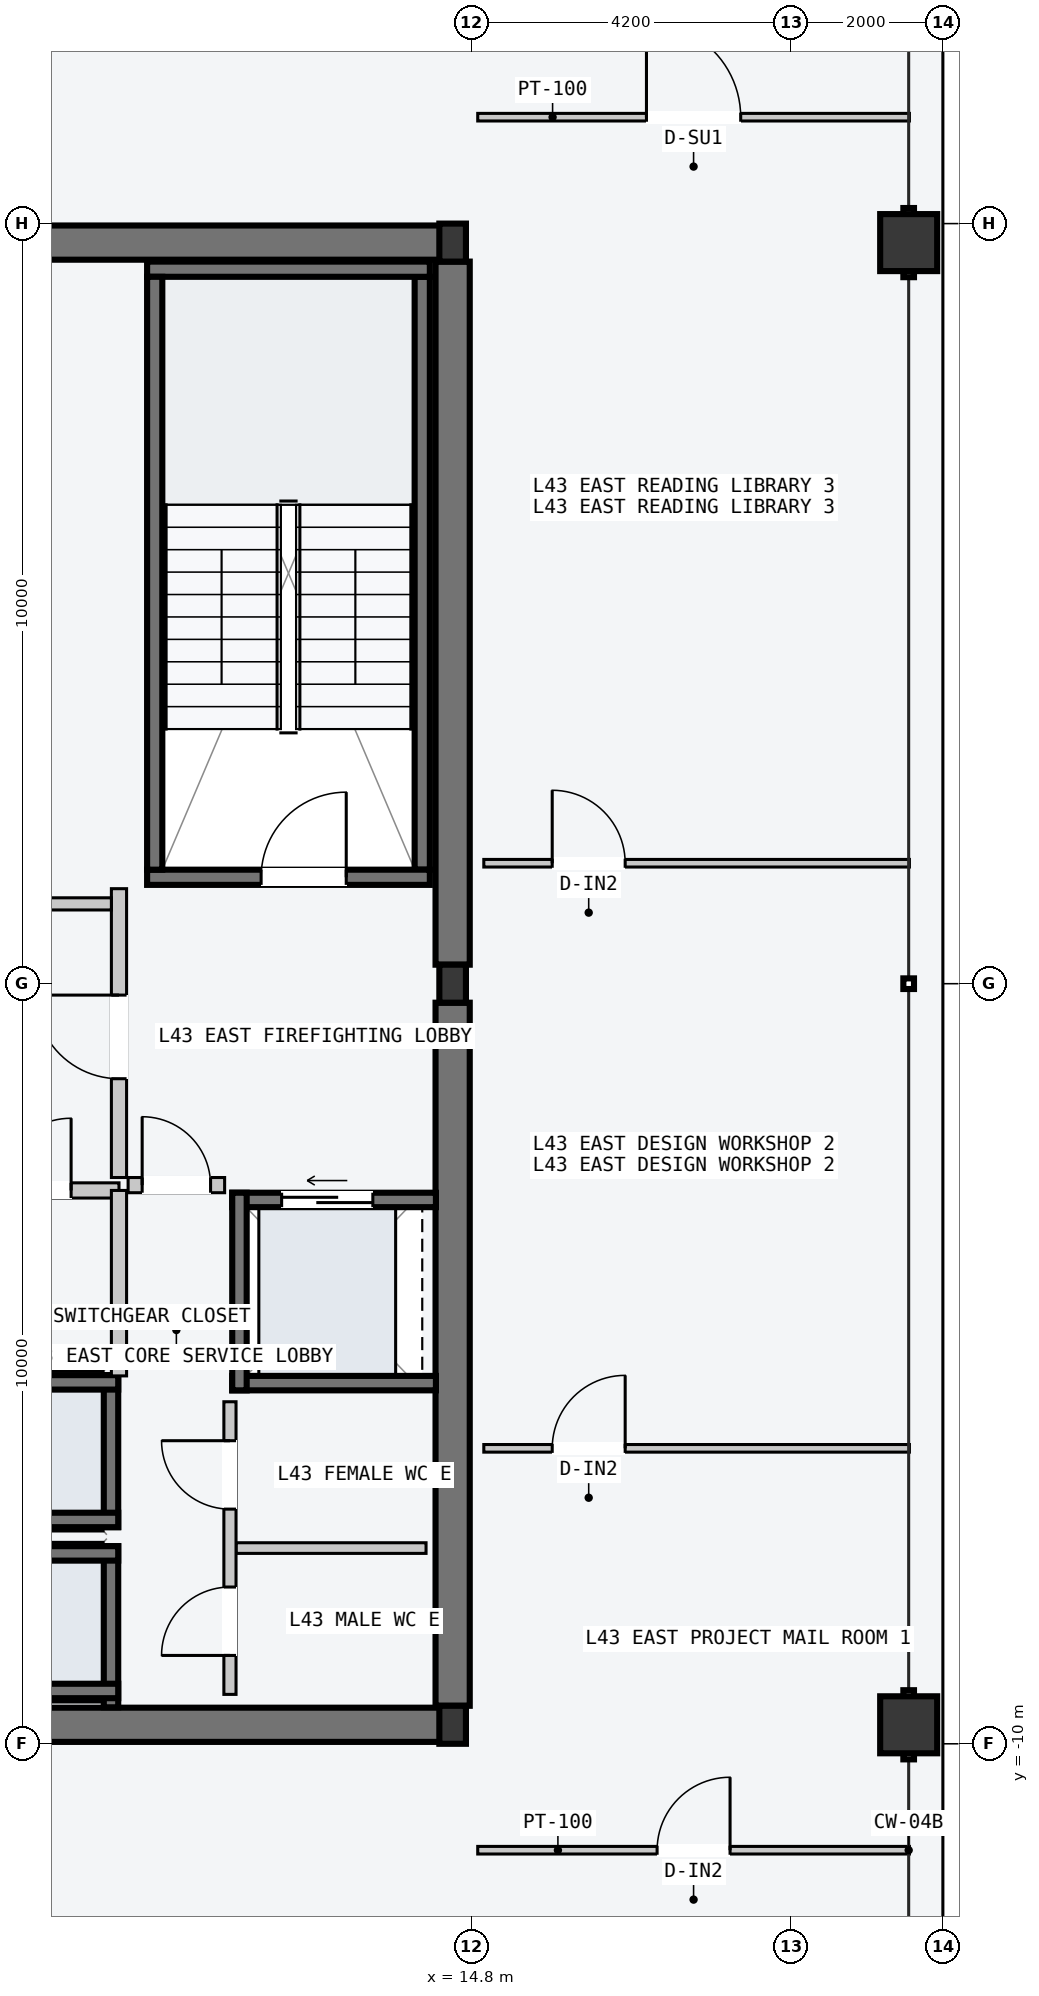
"""IFC4 building model, lengths in metres.
Left out: names, types, materials, properties, quantities, classifications, styles, units other than length and angle.
Written with IfcOpenShell. Run it as: python <this file> out.ifc"""

import sys

from ifc_helpers import new_model, si_unit, direction, frame, frame_2d, origin, origin_2d, place, context, subcontext, project, spatial, rectangle, hollow_rectangle, i_section, extrude, element, fill, save


model = new_model("IFC4")
c1 = context("Model", 3, precision=1e-05, world=origin(), true_north=direction((0.0, 1.0)))
c2 = subcontext(c1, "Body", "Model", "MODEL_VIEW")
j1 = project(units=[si_unit("LENGTHUNIT", "METRE"), si_unit("PLANEANGLEUNIT", "RADIAN")], contexts=[c1])
p1 = place(None, origin())
s1 = spatial("IfcSite", under=j1, at=p1, CompositionType="ELEMENT")
p2 = place(p1, origin())
s2 = spatial("IfcBuilding", under=s1, at=p2, CompositionType="ELEMENT")
p3 = place(p2, frame((0.0, 0.0, 165.9)))
s3 = spatial("IfcBuildingStorey", under=s2, at=p3, CompositionType="ELEMENT", Elevation=165.9)
for number, where, z_axis, x_axis in (
    (1, (8.07, -9.75, -0.2), (0.0, 0.0, 1.0), (1.0, 0.0, 0.0)),
    (2, (8.07, 9.75, -0.2), (0.0, 0.0, 1.0), (1.0, 0.0, 0.0)),
):
    element("IfcWall", number, at=place(p3, frame(where, z_axis=z_axis, x_axis=x_axis)), inside=s3, PredefinedType="SHEAR", context=c2, shape_type="SweptSolid", body=[
        extrude(rectangle(XDim=6.46, YDim=0.45, at=frame_2d((3.23, 0.0))), origin(), (0.0, 0.0, 1.0), 3.6),
    ])
for number, where, z_axis, x_axis in (
    (3, (14.55, -9.5, -0.2), (0.0, 0.0, 1.0), (0.0, 1.0, 0.0)),
    (4, (14.55, 0.25, -0.2), (0.0, 0.0, 1.0), (0.0, 1.0, 0.0)),
):
    element("IfcWall", number, at=place(p3, frame(where, z_axis=z_axis, x_axis=x_axis)), inside=s3, PredefinedType="SHEAR", context=c2, shape_type="SweptSolid", body=[
        extrude(rectangle(XDim=9.25, YDim=0.45, at=frame_2d((4.625, 0.0))), origin(), (0.0, 0.0, 1.0), 3.6),
    ])
p4 = place(p3, frame((14.15, 1.5, -0.2), z_axis=(0.0, 0.0, 1.0), x_axis=(0.0, 1.0, 0.0)))
e5 = element("IfcWall", 5, at=p4, inside=s3, PredefinedType="SOLIDWALL", context=c2, shape_type="SweptSolid", body=[
    extrude(rectangle(XDim=7.8, YDim=0.2, at=frame_2d((3.9, 0.0))), origin(), (0.0, 0.0, 1.0), 3.6),
])
p5 = place(p3, frame((10.53, 1.4, -0.2), z_axis=(0.0, 0.0, 1.0), x_axis=(1.0, 0.0, 0.0)))
e6 = element("IfcWall", 6, at=p5, inside=s3, PredefinedType="SOLIDWALL", context=c2, shape_type="SweptSolid", body=[
    extrude(rectangle(XDim=3.72, YDim=0.2, at=frame_2d((1.86, 0.0))), origin(), (0.0, 0.0, 1.0), 3.6),
])
p6 = place(p5, frame((1.5, 0.0, 0.2)))
e7 = element("IfcOpeningElement", 7, at=p6, cuts=e6, PredefinedType="OPENING", context=c2, shape_type="SweptSolid", body=[
    extrude(rectangle(XDim=1.12, YDim=2.18, at=frame_2d((0.56, 1.09))), frame((0.0, 0.11, 0.0), z_axis=(0.0, -1.0, 0.0), x_axis=(1.0, 0.0, 0.0)), (0.0, 0.0, 1.0), 0.22),
])
p7 = place(p3, frame((10.53, 9.4, -0.2), z_axis=(0.0, 0.0, 1.0), x_axis=(1.0, 0.0, 0.0)))
e8 = element("IfcWall", 8, at=p7, inside=s3, PredefinedType="SOLIDWALL", context=c2, shape_type="SweptSolid", body=[
    extrude(rectangle(XDim=3.72, YDim=0.2, at=frame_2d((1.86, 0.0))), origin(), (0.0, 0.0, 1.0), 3.6),
])
p8 = place(p3, frame((10.63, 1.5, -0.2), z_axis=(0.0, 0.0, 1.0), x_axis=(0.0, 1.0, 0.0)))
e9 = element("IfcWall", 9, at=p8, inside=s3, PredefinedType="SOLIDWALL", context=c2, shape_type="SweptSolid", body=[
    extrude(rectangle(XDim=7.8, YDim=0.2, at=frame_2d((3.9, 0.0))), origin(), (0.0, 0.0, 1.0), 3.6),
])
for number, where, z_axis, x_axis in (
    (10, (14.55, -9.75, 0.0), (0.0, 0.0, 1.0), (1.0, 0.0, 0.0)),
    (11, (14.55, 0.0, 0.0), (0.0, 0.0, 1.0), (1.0, 0.0, 0.0)),
    (12, (14.55, 9.75, 0.0), (0.0, 0.0, 1.0), (1.0, 0.0, 0.0)),
):
    element("IfcColumn", number, at=place(p3, frame(where, z_axis=z_axis, x_axis=x_axis)), inside=s3, PredefinedType="COLUMN", context=c2, shape_type="SweptSolid", body=[
        extrude(i_section(OverallWidth=0.35, OverallDepth=0.5, WebThickness=0.02, FlangeThickness=0.032, at=origin_2d()), origin(), (0.0, 0.0, 1.0), 3.6),
    ])
for number, where, z_axis, x_axis in (
    (13, (20.55, -9.75, 0.0), (0.0, 0.0, 1.0), (0.0, 1.0, 0.0)),
    (14, (20.55, 9.75, 0.0), (0.0, 0.0, 1.0), (0.0, 1.0, 0.0)),
):
    element("IfcColumn", number, at=place(p3, frame(where, z_axis=z_axis, x_axis=x_axis)), inside=s3, PredefinedType="COLUMN", context=c2, shape_type="SweptSolid", body=[
        extrude(hollow_rectangle(XDim=0.75, YDim=0.75, WallThickness=0.032, at=origin_2d()), origin(), (0.0, 0.0, 1.0), 3.6),
    ])
p9 = place(p3, frame((10.055, -9.52, -0.2), z_axis=(0.0, 0.0, 1.0), x_axis=(0.0, 1.0, 0.0)))
e15 = element("IfcWall", 15, at=p9, inside=s3, PredefinedType="SOLIDWALL", context=c2, shape_type="SweptSolid", body=[
    extrude(rectangle(XDim=2.12, YDim=0.19, at=frame_2d((1.06, 0.0))), origin(), (0.0, 0.0, 1.0), 3.6),
])
for number, where, z_axis, x_axis in (
    (16, (7.95, -7.495, -0.2), (0.0, 0.0, 1.0), (1.0, 0.0, 0.0)),
    (17, (7.95, -9.305, -0.2), (0.0, 0.0, 1.0), (1.0, 0.0, 0.0)),
):
    element("IfcWall", number, at=place(p3, frame(where, z_axis=z_axis, x_axis=x_axis)), inside=s3, PredefinedType="SOLIDWALL", context=c2, shape_type="SweptSolid", body=[
        extrude(rectangle(XDim=2.2, YDim=0.19, at=frame_2d((1.1, 0.0))), origin(), (0.0, 0.0, 1.0), 3.6),
    ])
p10 = place(p3, frame((10.055, -7.15, -0.2), z_axis=(0.0, 0.0, 1.0), x_axis=(0.0, 1.0, 0.0)))
e18 = element("IfcWall", 18, at=p10, inside=s3, PredefinedType="SOLIDWALL", context=c2, shape_type="SweptSolid", body=[
    extrude(rectangle(XDim=2.0, YDim=0.19, at=frame_2d((1.0, 0.0))), origin(), (0.0, 0.0, 1.0), 3.6),
])
for number, where, z_axis, x_axis in (
    (19, (7.95, -5.245, -0.2), (0.0, 0.0, 1.0), (1.0, 0.0, 0.0)),
    (20, (7.95, -7.055, -0.2), (0.0, 0.0, 1.0), (1.0, 0.0, 0.0)),
):
    element("IfcWall", number, at=place(p3, frame(where, z_axis=z_axis, x_axis=x_axis)), inside=s3, PredefinedType="SOLIDWALL", context=c2, shape_type="SweptSolid", body=[
        extrude(rectangle(XDim=2.2, YDim=0.19, at=frame_2d((1.1, 0.0))), origin(), (0.0, 0.0, 1.0), 3.6),
    ])
p11 = place(p3, frame((11.65, -2.845, -0.2), z_axis=(0.0, 0.0, 1.0), x_axis=(1.0, 0.0, 0.0)))
e21 = element("IfcWall", 21, at=p11, inside=s3, PredefinedType="SOLIDWALL", context=c2, shape_type="SweptSolid", body=[
    extrude(rectangle(XDim=2.68, YDim=0.19, at=frame_2d((1.34, 0.0))), origin(), (0.0, 0.0, 1.0), 3.6),
])
p12 = place(p11, frame((0.65, 0.0, 0.2)))
e22 = element("IfcOpeningElement", 22, at=p12, cuts=e21, PredefinedType="OPENING", context=c2, shape_type="SweptSolid", body=[
    extrude(rectangle(XDim=1.2, YDim=2.2, at=frame_2d((0.6, 1.1))), frame((0.0, 0.105, 0.0), z_axis=(0.0, -1.0, 0.0), x_axis=(1.0, 0.0, 0.0)), (0.0, 0.0, 1.0), 0.21),
])
p13 = place(p3, frame((11.65, -5.255, -0.2), z_axis=(0.0, 0.0, 1.0), x_axis=(1.0, 0.0, 0.0)))
e23 = element("IfcWall", 23, at=p13, inside=s3, PredefinedType="SOLIDWALL", context=c2, shape_type="SweptSolid", body=[
    extrude(rectangle(XDim=2.68, YDim=0.19, at=frame_2d((1.34, 0.0))), origin(), (0.0, 0.0, 1.0), 3.6),
])
p14 = place(p3, frame((11.745, -5.35, -0.2), z_axis=(0.0, 0.0, 1.0), x_axis=(0.0, 1.0, 0.0)))
e24 = element("IfcWall", 24, at=p14, inside=s3, PredefinedType="SOLIDWALL", context=c2, shape_type="SweptSolid", body=[
    extrude(rectangle(XDim=2.6, YDim=0.19, at=frame_2d((1.3, 0.0))), origin(), (0.0, 0.0, 1.0), 3.6),
])
p15 = place(p3, frame((10.16, -2.55, 0.0), z_axis=(0.0, 0.0, 1.0), x_axis=(0.0, 1.0, 0.0)))
e25 = element("IfcWall", 25, at=p15, inside=s3, PredefinedType="PARTITIONING", context=c2, shape_type="SweptSolid", body=[
    extrude(rectangle(XDim=3.8, YDim=0.2, at=frame_2d((1.9, 0.0))), origin(), (0.0, 0.0, 1.0), 3.4),
])
p16 = place(p15, frame((1.3, 0.0, 0.0)))
e26 = element("IfcOpeningElement", 26, at=p16, cuts=e25, PredefinedType="OPENING", context=c2, shape_type="SweptSolid", body=[
    extrude(rectangle(XDim=1.1, YDim=2.15, at=frame_2d((0.55, 1.075))), frame((0.0, 0.11, 0.0), z_axis=(0.0, -1.0, 0.0), x_axis=(1.0, 0.0, 0.0)), (0.0, 0.0, 1.0), 0.22),
])
p17 = place(p3, frame((10.28, -2.65, 0.0), z_axis=(0.0, 0.0, 1.0), x_axis=(1.0, 0.0, 0.0)))
e27 = element("IfcWall", 27, at=p17, inside=s3, PredefinedType="PARTITIONING", context=c2, shape_type="SweptSolid", body=[
    extrude(rectangle(XDim=1.27, YDim=0.2, at=frame_2d((0.635, 0.0))), origin(), (0.0, 0.0, 1.0), 3.4),
])
p18 = place(p17, frame((0.185, 0.0, 0.0)))
e28 = element("IfcOpeningElement", 28, at=p18, cuts=e27, PredefinedType="OPENING", context=c2, shape_type="SweptSolid", body=[
    extrude(rectangle(XDim=0.9, YDim=2.15, at=frame_2d((0.45, 1.075))), frame((0.0, 0.11, 0.0), z_axis=(0.0, -1.0, 0.0), x_axis=(1.0, 0.0, 0.0)), (0.0, 0.0, 1.0), 0.22),
])
p19 = place(p3, frame((7.96, -2.72, 0.0), z_axis=(0.0, 0.0, 1.0), x_axis=(1.0, 0.0, 0.0)))
e29 = element("IfcWall", 29, at=p19, inside=s3, PredefinedType="PARTITIONING", context=c2, shape_type="SweptSolid", body=[
    extrude(rectangle(XDim=2.2, YDim=0.2, at=frame_2d((1.1, 0.0))), origin(), (0.0, 0.0, 1.0), 3.4),
])
p20 = place(p19, frame((0.62, 0.0, 0.0)))
e30 = element("IfcOpeningElement", 30, at=p20, cuts=e29, PredefinedType="OPENING", context=c2, shape_type="SweptSolid", body=[
    extrude(rectangle(XDim=0.95, YDim=2.1, at=frame_2d((0.475, 1.05))), frame((0.0, 0.11, 0.0), z_axis=(0.0, -1.0, 0.0), x_axis=(1.0, 0.0, 0.0)), (0.0, 0.0, 1.0), 0.22),
])
p21 = place(p3, frame((10.16, -5.16, 0.0), z_axis=(0.0, 0.0, 1.0), x_axis=(0.0, 1.0, 0.0)))
e31 = element("IfcWall", 31, at=p21, inside=s3, PredefinedType="PARTITIONING", context=c2, shape_type="SweptSolid", body=[
    extrude(rectangle(XDim=2.44, YDim=0.2, at=frame_2d((1.22, 0.0))), origin(), (0.0, 0.0, 1.0), 3.4),
])
p22 = place(p3, frame((11.7, -7.425, 0.0), z_axis=(0.0, 0.0, 1.0), x_axis=(1.0, 0.0, 0.0)))
e32 = element("IfcWall", 32, at=p22, inside=s3, PredefinedType="PARTITIONING", context=c2, shape_type="SweptSolid", body=[
    extrude(rectangle(XDim=2.5, YDim=0.14, at=frame_2d((1.25, 0.0))), origin(), (0.0, 0.0, 1.0), 3.4),
])
p23 = place(p3, frame((11.62, -9.35, 0.0), z_axis=(0.0, 0.0, 1.0), x_axis=(0.0, 1.0, 0.0)))
e33 = element("IfcWall", 33, at=p23, inside=s3, PredefinedType="PARTITIONING", context=c2, shape_type="SweptSolid", body=[
    extrude(rectangle(XDim=3.85, YDim=0.16, at=frame_2d((1.925, 0.0))), origin(), (0.0, 0.0, 1.0), 3.4),
])
p24 = place(p23, frame((0.512, 0.0, 0.0)))
e34 = element("IfcOpeningElement", 34, at=p24, cuts=e33, PredefinedType="OPENING", context=c2, shape_type="SweptSolid", body=[
    extrude(rectangle(XDim=0.9, YDim=2.15, at=frame_2d((0.45, 1.075))), frame((0.0, 0.09, 0.0), z_axis=(0.0, -1.0, 0.0), x_axis=(1.0, 0.0, 0.0)), (0.0, 0.0, 1.0), 0.18),
])
p25 = place(p23, frame((2.438, 0.0, 0.0)))
e35 = element("IfcOpeningElement", 35, at=p25, cuts=e33, PredefinedType="OPENING", context=c2, shape_type="SweptSolid", body=[
    extrude(rectangle(XDim=0.9, YDim=2.15, at=frame_2d((0.45, 1.075))), frame((0.0, 0.09, 0.0), z_axis=(0.0, -1.0, 0.0), x_axis=(1.0, 0.0, 0.0)), (0.0, 0.0, 1.0), 0.18),
])
p26 = place(p3, frame((1.26, 1.05, 0.0), z_axis=(0.0, 0.0, 1.0), x_axis=(1.0, 0.0, 0.0)))
e36 = element("IfcWall", 36, at=p26, inside=s3, PredefinedType="PARTITIONING", context=c2, shape_type="SweptSolid", body=[
    extrude(rectangle(XDim=8.8, YDim=0.16, at=frame_2d((4.4, 0.0))), origin(), (0.0, 0.0, 1.0), 3.4),
])
p27 = place(p3, frame((14.88, 11.4, 0.0), z_axis=(0.0, 0.0, 1.0), x_axis=(1.0, 0.0, 0.0)))
e37 = element("IfcWall", 37, at=p27, inside=s3, PredefinedType="PARTITIONING", context=c2, shape_type="SweptSolid", body=[
    extrude(rectangle(XDim=5.68, YDim=0.1, at=frame_2d((2.84, 0.0))), origin(), (0.0, 0.0, 1.0), 3.4),
])
p28 = place(p27, frame((2.22, 0.0, 0.0)))
e38 = element("IfcOpeningElement", 38, at=p28, cuts=e37, PredefinedType="OPENING", context=c2, shape_type="SweptSolid", body=[
    extrude(rectangle(XDim=1.24, YDim=2.24, at=frame_2d((0.62, 1.12))), frame((0.0, 0.06, 0.0), z_axis=(0.0, -1.0, 0.0), x_axis=(1.0, 0.0, 0.0)), (0.0, 0.0, 1.0), 0.12),
])
p29 = place(p3, frame((14.88, -11.4, 0.0), z_axis=(0.0, 0.0, 1.0), x_axis=(1.0, 0.0, 0.0)))
e39 = element("IfcWall", 39, at=p29, inside=s3, PredefinedType="PARTITIONING", context=c2, shape_type="SweptSolid", body=[
    extrude(rectangle(XDim=5.68, YDim=0.1, at=frame_2d((2.84, 0.0))), origin(), (0.0, 0.0, 1.0), 3.4),
])
p30 = place(p29, frame((2.36, 0.0, 0.0)))
e40 = element("IfcOpeningElement", 40, at=p30, cuts=e39, PredefinedType="OPENING", context=c2, shape_type="SweptSolid", body=[
    extrude(rectangle(XDim=0.96, YDim=2.18, at=frame_2d((0.48, 1.09))), frame((0.0, 0.06, 0.0), z_axis=(0.0, -1.0, 0.0), x_axis=(1.0, 0.0, 0.0)), (0.0, 0.0, 1.0), 0.12),
])
p31 = place(p3, frame((14.96, -6.113, 0.0), z_axis=(0.0, 0.0, 1.0), x_axis=(1.0, 0.0, 0.0)))
e41 = element("IfcWall", 41, at=p31, inside=s3, PredefinedType="PARTITIONING", context=c2, shape_type="SweptSolid", body=[
    extrude(rectangle(XDim=5.6, YDim=0.1, at=frame_2d((2.8, 0.0))), origin(), (0.0, 0.0, 1.0), 3.4),
])
p32 = place(p31, frame((0.9, 0.0, 0.0)))
e42 = element("IfcOpeningElement", 42, at=p32, cuts=e41, PredefinedType="OPENING", context=c2, shape_type="SweptSolid", body=[
    extrude(rectangle(XDim=0.96, YDim=2.18, at=frame_2d((0.48, 1.09))), frame((0.0, 0.06, 0.0), z_axis=(0.0, -1.0, 0.0), x_axis=(1.0, 0.0, 0.0)), (0.0, 0.0, 1.0), 0.12),
])
p33 = place(p3, frame((14.96, 1.585, 0.0), z_axis=(0.0, 0.0, 1.0), x_axis=(1.0, 0.0, 0.0)))
e43 = element("IfcWall", 43, at=p33, inside=s3, PredefinedType="PARTITIONING", context=c2, shape_type="SweptSolid", body=[
    extrude(rectangle(XDim=5.6, YDim=0.1, at=frame_2d((2.8, 0.0))), origin(), (0.0, 0.0, 1.0), 3.4),
])
p34 = place(p33, frame((0.9, 0.0, 0.0)))
e44 = element("IfcOpeningElement", 44, at=p34, cuts=e43, PredefinedType="OPENING", context=c2, shape_type="SweptSolid", body=[
    extrude(rectangle(XDim=0.96, YDim=2.18, at=frame_2d((0.48, 1.09))), frame((0.0, 0.06, 0.0), z_axis=(0.0, -1.0, 0.0), x_axis=(1.0, 0.0, 0.0)), (0.0, 0.0, 1.0), 0.12),
])
p35 = place(p6, origin())
e45 = element("IfcDoor", 45, at=p35, inside=s3, OperationType="SINGLE_SWING_RIGHT", PredefinedType="DOOR", context=c2, shape_type="SweptSolid", body=[
    extrude(rectangle(XDim=1.12, YDim=2.18, at=frame_2d((0.56, 1.09))), frame((0.0, 0.025, 0.0), z_axis=(0.0, -1.0, 0.0), x_axis=(1.0, 0.0, 0.0)), (0.0, 0.0, 1.0), 0.05),
])
fill(e7, e45)
p36 = place(p12, origin())
e46 = element("IfcDoor", 46, at=p36, inside=s3, OperationType="SLIDING_TO_LEFT", PredefinedType="DOOR", context=c2, shape_type="SweptSolid", body=[
    extrude(rectangle(XDim=1.2, YDim=2.2, at=frame_2d((0.6, 1.1))), frame((0.0, 0.025, 0.0), z_axis=(0.0, -1.0, 0.0), x_axis=(1.0, 0.0, 0.0)), (0.0, 0.0, 1.0), 0.05),
])
fill(e22, e46)
p37 = place(p16, origin())
e47 = element("IfcDoor", 47, at=p37, inside=s3, OperationType="SINGLE_SWING_RIGHT", PredefinedType="DOOR", context=c2, shape_type="SweptSolid", body=[
    extrude(rectangle(XDim=1.1, YDim=2.15, at=frame_2d((0.55, 1.075))), frame((0.0, 0.025, 0.0), z_axis=(0.0, -1.0, 0.0), x_axis=(1.0, 0.0, 0.0)), (0.0, 0.0, 1.0), 0.05),
])
fill(e26, e47)
p38 = place(p18, origin())
e48 = element("IfcDoor", 48, at=p38, inside=s3, OperationType="SINGLE_SWING_LEFT", PredefinedType="DOOR", context=c2, shape_type="SweptSolid", body=[
    extrude(rectangle(XDim=0.9, YDim=2.15, at=frame_2d((0.45, 1.075))), frame((0.0, 0.025, 0.0), z_axis=(0.0, -1.0, 0.0), x_axis=(1.0, 0.0, 0.0)), (0.0, 0.0, 1.0), 0.05),
])
fill(e28, e48)
p39 = place(p20, origin())
e49 = element("IfcDoor", 49, at=p39, inside=s3, OperationType="SINGLE_SWING_RIGHT", PredefinedType="DOOR", context=c2, shape_type="SweptSolid", body=[
    extrude(rectangle(XDim=0.95, YDim=2.1, at=frame_2d((0.475, 1.05))), frame((0.0, 0.025, 0.0), z_axis=(0.0, -1.0, 0.0), x_axis=(1.0, 0.0, 0.0)), (0.0, 0.0, 1.0), 0.05),
])
fill(e30, e49)
p40 = place(p24, origin())
e50 = element("IfcDoor", 50, at=p40, inside=s3, OperationType="SINGLE_SWING_LEFT", PredefinedType="DOOR", context=c2, shape_type="SweptSolid", body=[
    extrude(rectangle(XDim=0.9, YDim=2.15, at=frame_2d((0.45, 1.075))), frame((0.0, 0.025, 0.0), z_axis=(0.0, -1.0, 0.0), x_axis=(1.0, 0.0, 0.0)), (0.0, 0.0, 1.0), 0.05),
])
fill(e34, e50)
p41 = place(p25, origin())
e51 = element("IfcDoor", 51, at=p41, inside=s3, OperationType="SINGLE_SWING_RIGHT", PredefinedType="DOOR", context=c2, shape_type="SweptSolid", body=[
    extrude(rectangle(XDim=0.9, YDim=2.15, at=frame_2d((0.45, 1.075))), frame((0.0, 0.025, 0.0), z_axis=(0.0, -1.0, 0.0), x_axis=(1.0, 0.0, 0.0)), (0.0, 0.0, 1.0), 0.05),
])
fill(e35, e51)
p42 = place(p28, origin())
e52 = element("IfcDoor", 52, at=p42, inside=s3, OperationType="SINGLE_SWING_LEFT", PredefinedType="DOOR", context=c2, shape_type="SweptSolid", body=[
    extrude(rectangle(XDim=1.24, YDim=2.24, at=frame_2d((0.62, 1.12))), frame((0.0, 0.025, 0.0), z_axis=(0.0, -1.0, 0.0), x_axis=(1.0, 0.0, 0.0)), (0.0, 0.0, 1.0), 0.05),
])
fill(e38, e52)
p43 = place(p30, origin())
e53 = element("IfcDoor", 53, at=p43, inside=s3, OperationType="SINGLE_SWING_RIGHT", PredefinedType="DOOR", context=c2, shape_type="SweptSolid", body=[
    extrude(rectangle(XDim=0.96, YDim=2.18, at=frame_2d((0.48, 1.09))), frame((0.0, 0.025, 0.0), z_axis=(0.0, -1.0, 0.0), x_axis=(1.0, 0.0, 0.0)), (0.0, 0.0, 1.0), 0.05),
])
fill(e40, e53)
p44 = place(p32, origin())
e54 = element("IfcDoor", 54, at=p44, inside=s3, OperationType="SINGLE_SWING_RIGHT", PredefinedType="DOOR", context=c2, shape_type="SweptSolid", body=[
    extrude(rectangle(XDim=0.96, YDim=2.18, at=frame_2d((0.48, 1.09))), frame((0.0, 0.025, 0.0), z_axis=(0.0, -1.0, 0.0), x_axis=(1.0, 0.0, 0.0)), (0.0, 0.0, 1.0), 0.05),
])
fill(e42, e54)
p45 = place(p34, origin())
e55 = element("IfcDoor", 55, at=p45, inside=s3, OperationType="SINGLE_SWING_LEFT", PredefinedType="DOOR", context=c2, shape_type="SweptSolid", body=[
    extrude(rectangle(XDim=0.96, YDim=2.18, at=frame_2d((0.48, 1.09))), frame((0.0, 0.025, 0.0), z_axis=(0.0, -1.0, 0.0), x_axis=(1.0, 0.0, 0.0)), (0.0, 0.0, 1.0), 0.05),
])
fill(e44, e55)
save(model, sys.argv[1])
